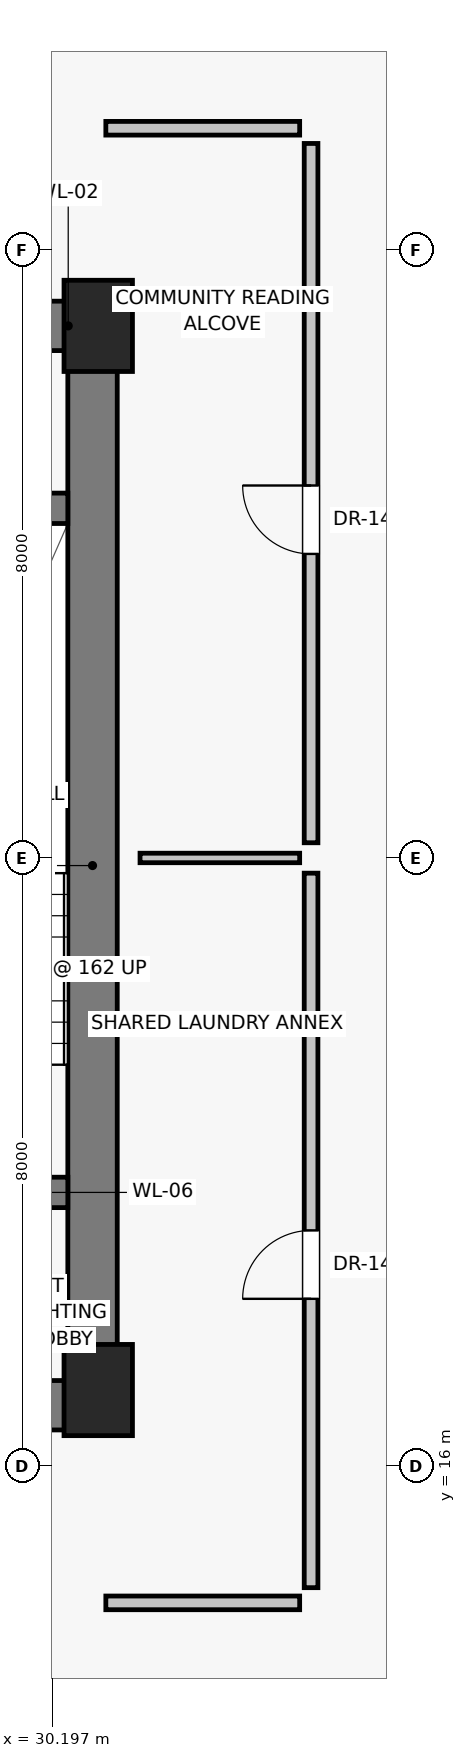
"""IFC4 building model, lengths in metres.
Left out: names, types, materials, properties, quantities, classifications, styles, units other than length and angle.
Written with IfcOpenShell. Run it as: python <this file> out.ifc"""

import sys

from ifc_helpers import new_model, si_unit, direction, frame, frame_2d, origin, origin_2d, place, context, subcontext, project, spatial, rectangle, extrude, source, transform, mapped, element, fill, save


model = new_model("IFC4")
c1 = context("Model", 3, precision=1e-05, world=origin(), true_north=direction((0.0, 1.0)))
c2 = subcontext(c1, "Body", "Model", "MODEL_VIEW")
j1 = project(units=[si_unit("LENGTHUNIT", "METRE"), si_unit("PLANEANGLEUNIT", "RADIAN")], contexts=[c1])
p1 = place(None, origin())
s1 = spatial("IfcSite", under=j1, at=p1, CompositionType="ELEMENT")
p2 = place(p1, origin())
s2 = spatial("IfcBuilding", under=s1, at=p2, CompositionType="ELEMENT")
p3 = place(p2, frame((0.0, 0.0, 126.25)))
s3 = spatial("IfcBuildingStorey", under=s2, at=p3, CompositionType="ELEMENT", Elevation=126.25)
for number, where, z_axis, x_axis in (
    (1, (30.8, 17.0, 0.0), (0.0, 0.0, 1.0), (1.0, 0.0, 0.0)),
    (2, (30.8, 31.0, 0.0), (0.0, 0.0, 1.0), (1.0, 0.0, 0.0)),
):
    element("IfcColumn", number, at=place(p3, frame(where, z_axis=z_axis, x_axis=x_axis)), inside=s3, PredefinedType="PILASTER", context=c2, shape_type="SweptSolid", body=[
        extrude(rectangle(XDim=0.9, YDim=1.2, at=origin_2d()), origin(), (0.0, 0.0, 1.0), 3.25),
    ])
p4 = place(p3, frame((30.725, 16.8, 0.0), z_axis=(0.0, 0.0, 1.0), x_axis=(0.0, 1.0, 0.0)))
e3 = element("IfcWall", 3, at=p4, inside=s3, PredefinedType="SHEAR", context=c2, shape_type="SweptSolid", body=[
    extrude(rectangle(XDim=14.2, YDim=0.65, at=frame_2d((7.1, 0.0))), origin(), (0.0, 0.0, 1.0), 3.0),
])
p5 = place(p3, frame((24.95, 16.8, 0.0), z_axis=(0.0, 0.0, 1.0), x_axis=(1.0, 0.0, 0.0)))
e4 = element("IfcWall", 4, at=p5, inside=s3, PredefinedType="SHEAR", context=c2, shape_type="SweptSolid", body=[
    extrude(rectangle(XDim=5.85, YDim=0.65, at=frame_2d((2.925, 0.0))), origin(), (0.0, 0.0, 1.0), 3.0),
])
p6 = place(p5, frame((2.15, 0.0, 0.0)))
e5 = element("IfcOpeningElement", 5, at=p6, cuts=e4, PredefinedType="OPENING", context=c2, shape_type="SweptSolid", body=[
    extrude(rectangle(XDim=1.2, YDim=2.03, at=frame_2d((0.6, 1.015))), frame((0.0, 0.335, 0.0), z_axis=(0.0, -1.0, 0.0), x_axis=(1.0, 0.0, 0.0)), (0.0, 0.0, 1.0), 0.67),
])
p7 = place(p3, frame((27.0, 31.0, 0.0), z_axis=(0.0, 0.0, 1.0), x_axis=(1.0, 0.0, 0.0)))
e6 = element("IfcWall", 6, at=p7, inside=s3, PredefinedType="SHEAR", context=c2, shape_type="SweptSolid", body=[
    extrude(rectangle(XDim=3.8, YDim=0.65, at=frame_2d((1.9, 0.0))), origin(), (0.0, 0.0, 1.0), 3.0),
])
p8 = place(p7, frame((0.45, 0.0, 0.0)))
e7 = element("IfcOpeningElement", 7, at=p8, cuts=e6, PredefinedType="OPENING", context=c2, shape_type="SweptSolid", body=[
    extrude(rectangle(XDim=0.86, YDim=2.01, at=frame_2d((0.43, 1.005))), frame((0.0, 0.335, 0.0), z_axis=(0.0, -1.0, 0.0), x_axis=(1.0, 0.0, 0.0)), (0.0, 0.0, 1.0), 0.67),
])
p9 = place(p7, frame((1.9, 0.0, 0.0)))
e8 = element("IfcOpeningElement", 8, at=p9, cuts=e6, PredefinedType="OPENING", context=c2, shape_type="SweptSolid", body=[
    extrude(rectangle(XDim=0.86, YDim=2.01, at=frame_2d((0.43, 1.005))), frame((0.0, 0.335, 0.0), z_axis=(0.0, -1.0, 0.0), x_axis=(1.0, 0.0, 0.0)), (0.0, 0.0, 1.0), 0.67),
])
p10 = place(p3, frame((27.0, 19.6, 0.0), z_axis=(0.0, 0.0, 1.0), x_axis=(1.0, 0.0, 0.0)))
e9 = element("IfcWall", 9, at=p10, inside=s3, PredefinedType="SHEAR", context=c2, shape_type="SweptSolid", body=[
    extrude(rectangle(XDim=3.4, YDim=0.4, at=frame_2d((1.7, 0.0))), origin(), (0.0, 0.0, 1.0), 3.0),
])
p11 = place(p10, frame((1.05, 0.0, 0.0)))
e10 = element("IfcOpeningElement", 10, at=p11, cuts=e9, PredefinedType="OPENING", context=c2, shape_type="SweptSolid", body=[
    extrude(rectangle(XDim=1.1, YDim=2.03, at=frame_2d((0.55, 1.015))), frame((0.0, 0.21, 0.0), z_axis=(0.0, -1.0, 0.0), x_axis=(1.0, 0.0, 0.0)), (0.0, 0.0, 1.0), 0.42),
])
p12 = place(p3, frame((27.0, 28.6, 0.0), z_axis=(0.0, 0.0, 1.0), x_axis=(1.0, 0.0, 0.0)))
e11 = element("IfcWall", 11, at=p12, inside=s3, PredefinedType="SHEAR", context=c2, shape_type="SweptSolid", body=[
    extrude(rectangle(XDim=3.4, YDim=0.4, at=frame_2d((1.7, 0.0))), origin(), (0.0, 0.0, 1.0), 3.0),
])
p13 = place(p3, frame((33.6, 14.4, 0.0), z_axis=(0.0, 0.0, 1.0), x_axis=(0.0, 1.0, 0.0)))
e12 = element("IfcWall", 12, at=p13, inside=s3, PredefinedType="PARTITIONING", context=c2, shape_type="SweptSolid", body=[
    extrude(rectangle(XDim=9.4, YDim=0.18, at=frame_2d((4.7, 0.0))), origin(), (0.0, 0.0, 1.0), 3.0),
])
p14 = place(p13, frame((3.8, 0.0, 0.0)))
e13 = element("IfcOpeningElement", 13, at=p14, cuts=e12, PredefinedType="OPENING", context=c2, shape_type="SweptSolid", body=[
    extrude(rectangle(XDim=0.9, YDim=2.01, at=frame_2d((0.45, 1.005))), frame((0.0, 0.1, 0.0), z_axis=(0.0, -1.0, 0.0), x_axis=(1.0, 0.0, 0.0)), (0.0, 0.0, 1.0), 0.2),
])
p15 = place(p3, frame((33.6, 24.2, 0.0), z_axis=(0.0, 0.0, 1.0), x_axis=(0.0, 1.0, 0.0)))
e14 = element("IfcWall", 14, at=p15, inside=s3, PredefinedType="PARTITIONING", context=c2, shape_type="SweptSolid", body=[
    extrude(rectangle(XDim=9.2, YDim=0.18, at=frame_2d((4.6, 0.0))), origin(), (0.0, 0.0, 1.0), 3.0),
])
p16 = place(p15, frame((3.8, 0.0, 0.0)))
e15 = element("IfcOpeningElement", 15, at=p16, cuts=e14, PredefinedType="OPENING", context=c2, shape_type="SweptSolid", body=[
    extrude(rectangle(XDim=0.9, YDim=2.01, at=frame_2d((0.45, 1.005))), frame((0.0, 0.1, 0.0), z_axis=(0.0, -1.0, 0.0), x_axis=(1.0, 0.0, 0.0)), (0.0, 0.0, 1.0), 0.2),
])
p17 = place(p3, frame((31.35, 24.0, 0.0), z_axis=(0.0, 0.0, 1.0), x_axis=(1.0, 0.0, 0.0)))
e16 = element("IfcWall", 16, at=p17, inside=s3, PredefinedType="PARTITIONING", context=c2, shape_type="SweptSolid", body=[
    extrude(rectangle(XDim=2.1, YDim=0.125, at=frame_2d((1.05, 0.0))), origin(), (0.0, 0.0, 1.0), 3.0),
])
for number, where, z_axis, x_axis in (
    (17, (30.9, 14.2, 0.0), (0.0, 0.0, 1.0), (1.0, 0.0, 0.0)),
    (18, (30.9, 33.6, 0.0), (0.0, 0.0, 1.0), (1.0, 0.0, 0.0)),
):
    element("IfcWall", number, at=place(p3, frame(where, z_axis=z_axis, x_axis=x_axis)), inside=s3, PredefinedType="PARTITIONING", context=c2, shape_type="SweptSolid", body=[
        extrude(rectangle(XDim=2.55, YDim=0.18, at=frame_2d((1.275, 0.0))), origin(), (0.0, 0.0, 1.0), 3.0),
    ])
m1 = source(origin(), c2, "Body", "SweptSolid", [
    extrude(rectangle(XDim=0.9, YDim=2.01, at=frame_2d((0.45, 1.005))), frame((0.0, 0.025, 0.0), z_axis=(0.0, -1.0, 0.0), x_axis=(1.0, 0.0, 0.0)), (0.0, 0.0, 1.0), 0.05),
])
p18 = place(p14, origin())
e19 = element("IfcDoor", 19, at=p18, inside=s3, OperationType="SINGLE_SWING_LEFT", PredefinedType="DOOR", context=c2, shape_type="MappedRepresentation", body=[
    mapped(m1, transform((0.0, 0.0, 0.0), scale=1.0)),
])
fill(e13, e19)
p19 = place(p16, origin())
e20 = element("IfcDoor", 20, at=p19, inside=s3, OperationType="SINGLE_SWING_RIGHT", PredefinedType="DOOR", context=c2, shape_type="MappedRepresentation", body=[
    mapped(m1, transform((0.0, 0.0, 0.0), scale=1.0)),
])
fill(e15, e20)
save(model, sys.argv[1])
